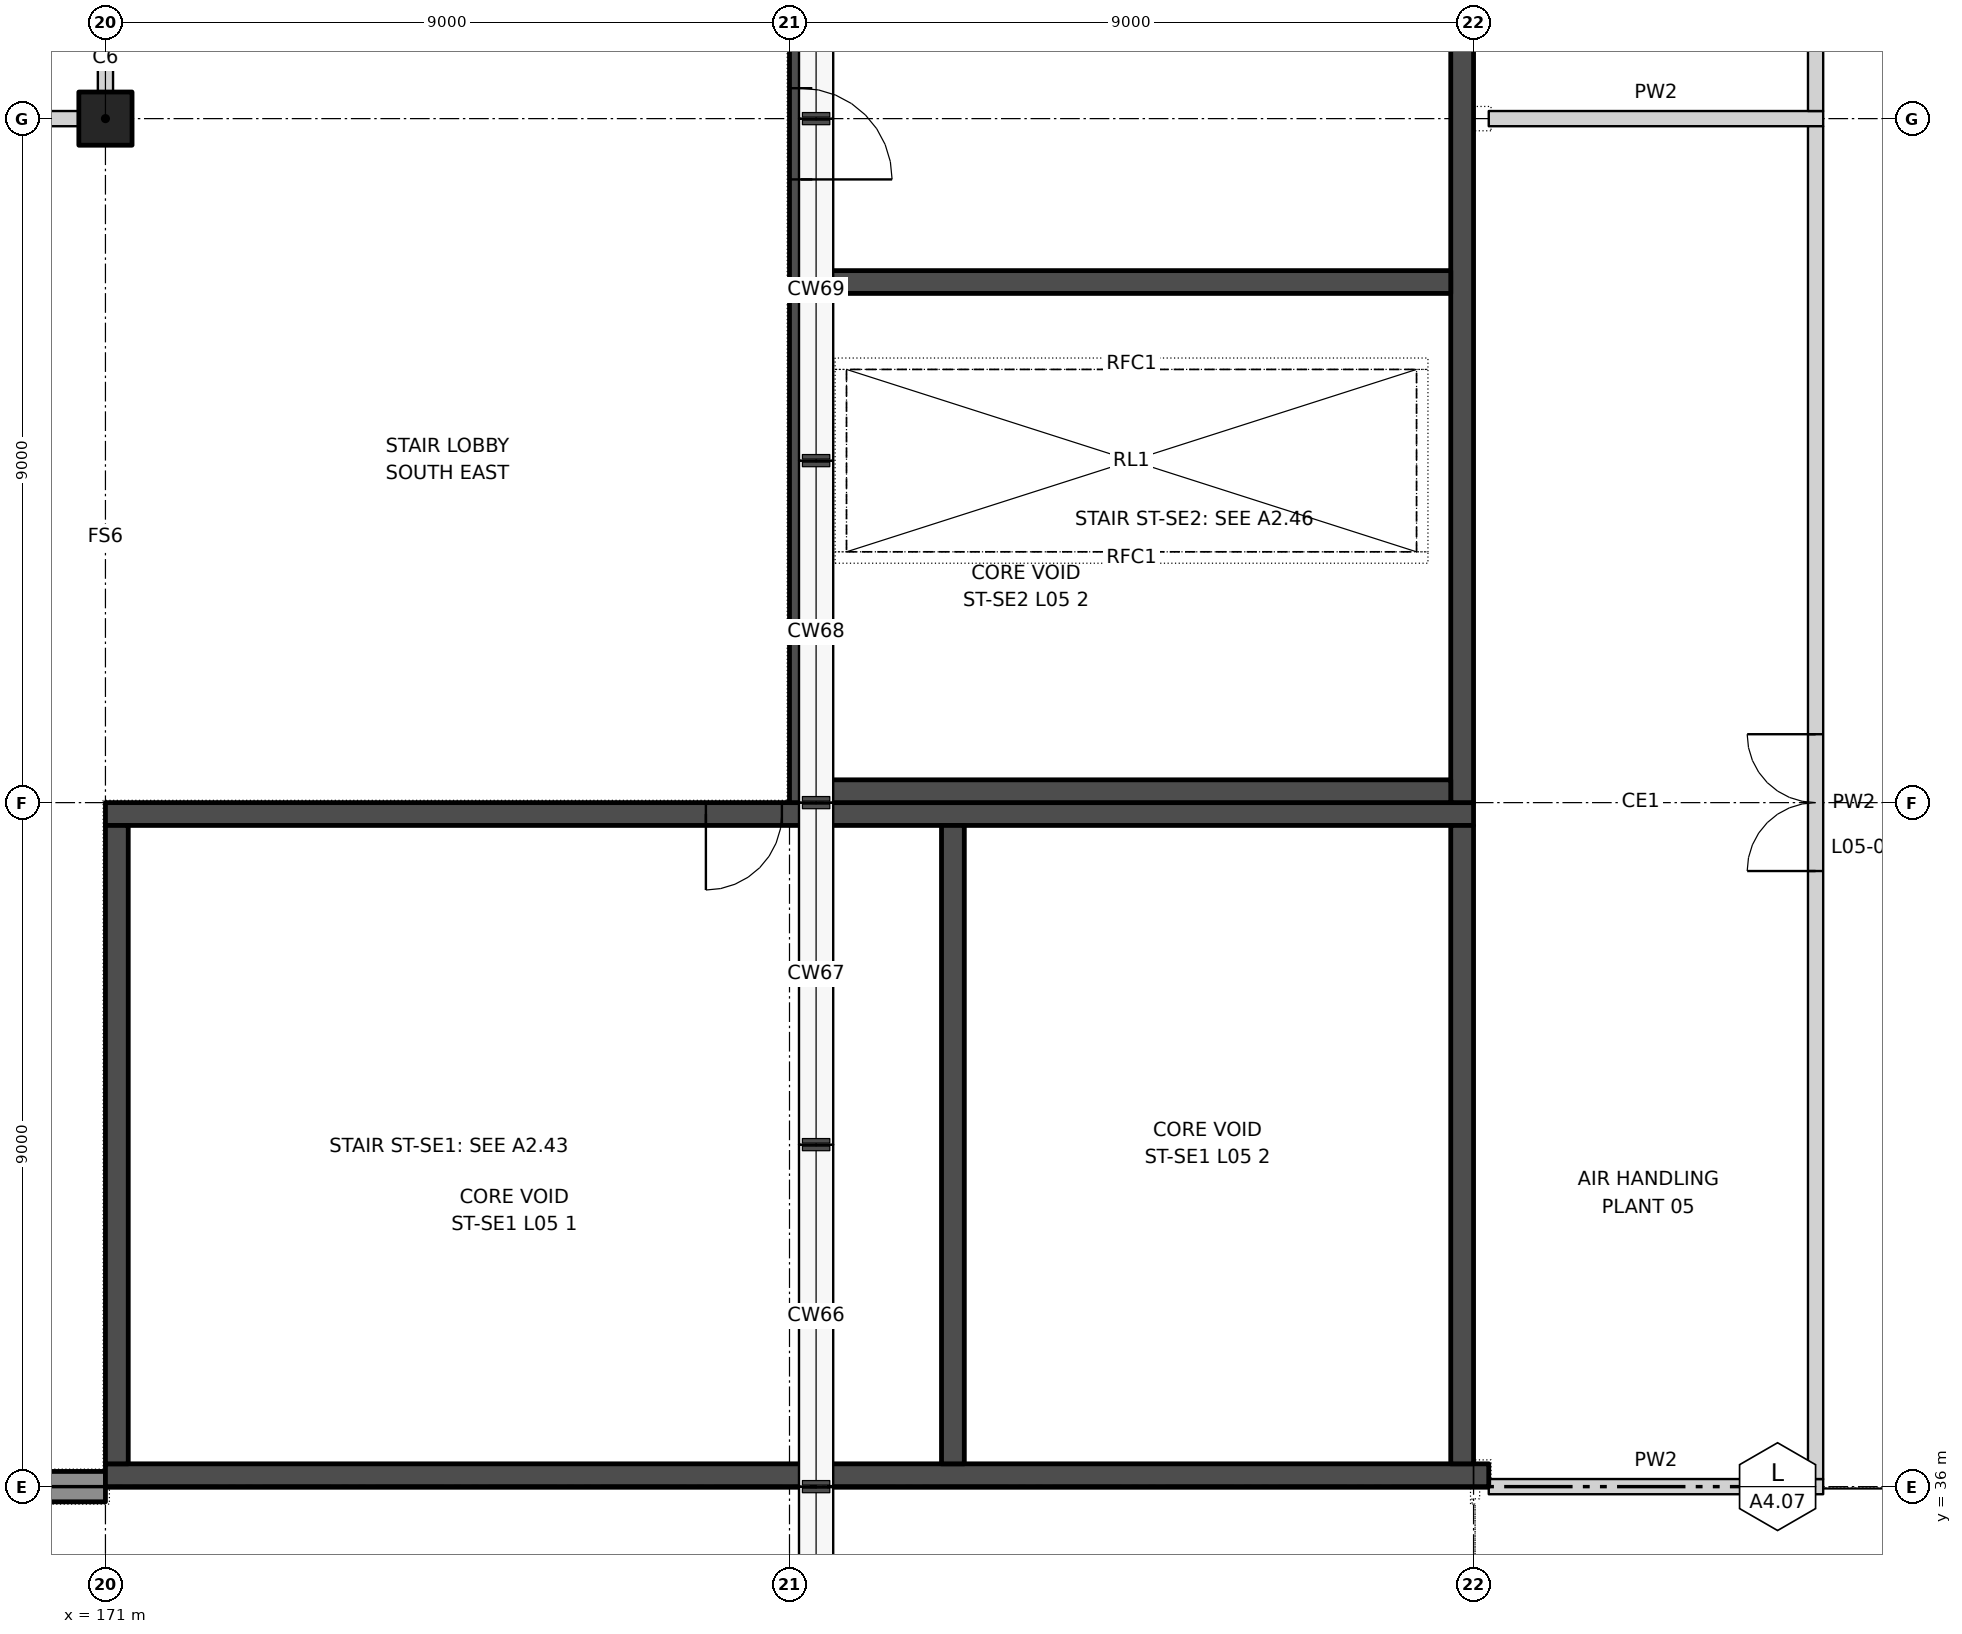
"""IFC4 building model, lengths in metres.
Left out: names, types, materials, properties, quantities, classifications, styles, units other than length and angle.
Written with IfcOpenShell. Run it as: python <this file> out.ifc"""

import sys

from ifc_helpers import new_model, si_unit, direction, frame, frame_2d, origin, origin_2d, place, context, subcontext, project, spatial, rectangle, extrude, element, fill, save


model = new_model("IFC4")
c1 = context("Model", 3, precision=1e-05, world=origin(), true_north=direction((0.0, 1.0)))
c2 = subcontext(c1, "Body", "Model", "MODEL_VIEW")
j1 = project(units=[si_unit("LENGTHUNIT", "METRE"), si_unit("PLANEANGLEUNIT", "RADIAN")], contexts=[c1])
p1 = place(None, origin())
s1 = spatial("IfcSite", under=j1, at=p1, CompositionType="ELEMENT")
p2 = place(p1, origin())
s2 = spatial("IfcBuilding", under=s1, at=p2, CompositionType="ELEMENT")
p3 = place(p2, frame((0.0, 0.0, 33.5)))
s3 = spatial("IfcBuildingStorey", under=s2, at=p3, CompositionType="ELEMENT", Elevation=33.5)
p4 = place(p3, frame((171.0, 54.0, 0.0), z_axis=(0.0, 0.0, 1.0), x_axis=(1.0, 0.0, 0.0)))
e1 = element("IfcColumn", 1, at=p4, inside=s3, PredefinedType="COLUMN", context=c2, shape_type="SweptSolid", body=[
    extrude(rectangle(XDim=0.7, YDim=0.7, at=origin_2d()), origin(), (0.0, 0.0, 1.0), 4.0),
])
p5 = place(p3, frame((90.0, 36.0, 0.0), z_axis=(0.0, 0.0, 1.0), x_axis=(1.0, 0.0, 0.0)))
e2 = element("IfcWall", 2, at=p5, inside=s3, PredefinedType="SOLIDWALL", context=c2, shape_type="SweptSolid", body=[
    extrude(rectangle(XDim=81.0, YDim=0.4, at=frame_2d((40.5, 0.0))), origin(), (0.0, 0.0, 1.0), 4.0),
])
p6 = place(p5, frame((3.9, 0.0, 0.0)))
e3 = element("IfcOpeningElement", 3, at=p6, cuts=e2, PredefinedType="OPENING", context=c2, shape_type="SweptSolid", body=[
    extrude(rectangle(XDim=1.2, YDim=2.1, at=frame_2d((0.6, 1.05))), frame((0.0, 0.21, 0.0), z_axis=(0.0, -1.0, 0.0), x_axis=(1.0, 0.0, 0.0)), (0.0, 0.0, 1.0), 0.42),
])
p7 = place(p5, frame((75.9, 0.0, 0.0)))
e4 = element("IfcOpeningElement", 4, at=p7, cuts=e2, PredefinedType="OPENING", context=c2, shape_type="SweptSolid", body=[
    extrude(rectangle(XDim=1.2, YDim=2.1, at=frame_2d((0.6, 1.05))), frame((0.0, 0.21, 0.0), z_axis=(0.0, -1.0, 0.0), x_axis=(1.0, 0.0, 0.0)), (0.0, 0.0, 1.0), 0.42),
])
p8 = place(p3, frame((189.2, 36.0, 0.0), z_axis=(0.0, 0.0, 1.0), x_axis=(1.0, 0.0, 0.0)))
e5 = element("IfcWall", 5, at=p8, inside=s3, PredefinedType="PARTITIONING", context=c2, shape_type="SweptSolid", body=[
    extrude(rectangle(XDim=4.4, YDim=0.2, at=frame_2d((2.2, 0.0))), origin(), (0.0, 0.0, 1.0), 4.0),
])
p9 = place(p3, frame((162.35, 54.0, 0.0), z_axis=(0.0, 0.0, 1.0), x_axis=(1.0, 0.0, 0.0)))
e6 = element("IfcWall", 6, at=p9, inside=s3, PredefinedType="PARTITIONING", context=c2, shape_type="SweptSolid", body=[
    extrude(rectangle(XDim=8.3, YDim=0.2, at=frame_2d((4.15, 0.0))), origin(), (0.0, 0.0, 1.0), 4.0),
])
p10 = place(p9, frame((3.55, 0.0, 0.0)))
e7 = element("IfcOpeningElement", 7, at=p10, cuts=e6, PredefinedType="OPENING", context=c2, shape_type="SweptSolid", body=[
    extrude(rectangle(XDim=1.2, YDim=2.1, at=frame_2d((0.6, 1.05))), frame((0.0, 0.11, 0.0), z_axis=(0.0, -1.0, 0.0), x_axis=(1.0, 0.0, 0.0)), (0.0, 0.0, 1.0), 0.22),
])
p11 = place(p3, frame((189.2, 54.0, 0.0), z_axis=(0.0, 0.0, 1.0), x_axis=(1.0, 0.0, 0.0)))
e8 = element("IfcWall", 8, at=p11, inside=s3, PredefinedType="PARTITIONING", context=c2, shape_type="SweptSolid", body=[
    extrude(rectangle(XDim=4.4, YDim=0.2, at=frame_2d((2.2, 0.0))), origin(), (0.0, 0.0, 1.0), 4.0),
])
p12 = place(p3, frame((171.0, 54.35, 0.0), z_axis=(0.0, 0.0, 1.0), x_axis=(0.0, 1.0, 0.0)))
e9 = element("IfcWall", 9, at=p12, inside=s3, PredefinedType="PARTITIONING", context=c2, shape_type="SweptSolid", body=[
    extrude(rectangle(XDim=5.65, YDim=0.2, at=frame_2d((2.825, 0.0))), origin(), (0.0, 0.0, 1.0), 4.0),
])
p13 = place(p3, frame((193.5, 36.1, 0.0), z_axis=(0.0, 0.0, 1.0), x_axis=(0.0, 1.0, 0.0)))
e10 = element("IfcWall", 10, at=p13, inside=s3, PredefinedType="PARTITIONING", context=c2, shape_type="SweptSolid", body=[
    extrude(rectangle(XDim=17.8, YDim=0.2, at=frame_2d((8.9, 0.0))), origin(), (0.0, 0.0, 1.0), 4.0),
])
p14 = place(p13, frame((8.0, 0.0, 0.0)))
e11 = element("IfcOpeningElement", 11, at=p14, cuts=e10, PredefinedType="OPENING", context=c2, shape_type="SweptSolid", body=[
    extrude(rectangle(XDim=1.8, YDim=2.1, at=frame_2d((0.9, 1.05))), frame((0.0, 0.11, 0.0), z_axis=(0.0, -1.0, 0.0), x_axis=(1.0, 0.0, 0.0)), (0.0, 0.0, 1.0), 0.22),
])
p15 = place(p3, frame((193.5, 54.1, 0.0), z_axis=(0.0, 0.0, 1.0), x_axis=(0.0, 1.0, 0.0)))
e12 = element("IfcWall", 12, at=p15, inside=s3, PredefinedType="PARTITIONING", context=c2, shape_type="SweptSolid", body=[
    extrude(rectangle(XDim=4.3, YDim=0.2, at=frame_2d((2.15, 0.0))), origin(), (0.0, 0.0, 1.0), 4.0),
])
p16 = place(p15, frame((1.65, 0.0, 0.0)))
e13 = element("IfcOpeningElement", 13, at=p16, cuts=e12, PredefinedType="OPENING", context=c2, shape_type="SweptSolid", body=[
    extrude(rectangle(XDim=1.0, YDim=2.1, at=frame_2d((0.5, 1.05))), frame((0.0, 0.11, 0.0), z_axis=(0.0, -1.0, 0.0), x_axis=(1.0, 0.0, 0.0)), (0.0, 0.0, 1.0), 0.22),
])
p17 = place(p3, frame((171.0, 44.85, 0.0), z_axis=(0.0, 0.0, 1.0), x_axis=(1.0, 0.0, 0.0)))
e14 = element("IfcWall", 14, at=p17, inside=s3, PredefinedType="SHEAR", context=c2, shape_type="SweptSolid", body=[
    extrude(rectangle(XDim=18.0, YDim=0.3, at=frame_2d((9.0, 0.0))), origin(), (0.0, 0.0, 1.0), 4.0),
])
p18 = place(p17, frame((7.9, 0.0, 0.0)))
e15 = element("IfcOpeningElement", 15, at=p18, cuts=e14, PredefinedType="OPENING", context=c2, shape_type="SweptSolid", body=[
    extrude(rectangle(XDim=1.0, YDim=2.1, at=frame_2d((0.5, 1.05))), frame((0.0, 0.16, 0.0), z_axis=(0.0, -1.0, 0.0), x_axis=(1.0, 0.0, 0.0)), (0.0, 0.0, 1.0), 0.32),
])
p19 = place(p3, frame((171.0, 36.15, 0.0), z_axis=(0.0, 0.0, 1.0), x_axis=(1.0, 0.0, 0.0)))
e16 = element("IfcWall", 16, at=p19, inside=s3, PredefinedType="SHEAR", context=c2, shape_type="SweptSolid", body=[
    extrude(rectangle(XDim=18.2, YDim=0.3, at=frame_2d((9.1, 0.0))), origin(), (0.0, 0.0, 1.0), 4.0),
])
for number, where, z_axis, x_axis in (
    (17, (171.15, 44.7, 0.0), (0.0, 0.0, 1.0), (0.0, -1.0, 0.0)),
    (18, (188.85, 44.7, 0.0), (0.0, 0.0, 1.0), (0.0, -1.0, 0.0)),
    (19, (182.15, 44.7, 0.0), (0.0, 0.0, 1.0), (0.0, -1.0, 0.0)),
):
    element("IfcWall", number, at=place(p3, frame(where, z_axis=z_axis, x_axis=x_axis)), inside=s3, PredefinedType="SHEAR", context=c2, shape_type="SweptSolid", body=[
        extrude(rectangle(XDim=8.4, YDim=0.3, at=frame_2d((4.2, 0.0))), origin(), (0.0, 0.0, 1.0), 4.0),
    ])
p20 = place(p3, frame((180.15, 63.0, 0.0), z_axis=(0.0, 0.0, 1.0), x_axis=(0.0, -1.0, 0.0)))
e20 = element("IfcWall", 20, at=p20, inside=s3, PredefinedType="SHEAR", context=c2, shape_type="SweptSolid", body=[
    extrude(rectangle(XDim=18.0, YDim=0.3, at=frame_2d((9.0, 0.0))), origin(), (0.0, 0.0, 1.0), 4.0),
])
p21 = place(p20, frame((8.6, 0.0, 0.0)))
e21 = element("IfcOpeningElement", 21, at=p21, cuts=e20, PredefinedType="OPENING", context=c2, shape_type="SweptSolid", body=[
    extrude(rectangle(XDim=1.2, YDim=2.1, at=frame_2d((0.6, 1.05))), frame((0.0, 0.16, 0.0), z_axis=(0.0, -1.0, 0.0), x_axis=(1.0, 0.0, 0.0)), (0.0, 0.0, 1.0), 0.32),
])
p22 = place(p3, frame((188.85, 63.0, 0.0), z_axis=(0.0, 0.0, 1.0), x_axis=(0.0, -1.0, 0.0)))
e22 = element("IfcWall", 22, at=p22, inside=s3, PredefinedType="SHEAR", context=c2, shape_type="SweptSolid", body=[
    extrude(rectangle(XDim=18.0, YDim=0.3, at=frame_2d((9.0, 0.0))), origin(), (0.0, 0.0, 1.0), 4.0),
])
for number, where, z_axis, x_axis in (
    (23, (180.3, 45.15, 0.0), (0.0, 0.0, 1.0), (1.0, 0.0, 0.0)),
    (24, (180.3, 51.85, 0.0), (0.0, 0.0, 1.0), (1.0, 0.0, 0.0)),
):
    element("IfcWall", number, at=place(p3, frame(where, z_axis=z_axis, x_axis=x_axis)), inside=s3, PredefinedType="SHEAR", context=c2, shape_type="SweptSolid", body=[
        extrude(rectangle(XDim=8.4, YDim=0.3, at=frame_2d((4.2, 0.0))), origin(), (0.0, 0.0, 1.0), 4.0),
    ])
p23 = place(p14, origin())
e25 = element("IfcDoor", 25, at=p23, inside=s3, OperationType="DOUBLE_DOOR_DOUBLE_SWING", PredefinedType="DOOR", context=c2, shape_type="SweptSolid", body=[
    extrude(rectangle(XDim=1.8, YDim=2.1, at=frame_2d((0.9, 1.05))), frame((0.0, 0.025, 0.0), z_axis=(0.0, -1.0, 0.0), x_axis=(1.0, 0.0, 0.0)), (0.0, 0.0, 1.0), 0.05),
])
fill(e11, e25)
p24 = place(p18, frame((1.0, 0.0, 0.0), z_axis=(0.0, 0.0, 1.0), x_axis=(-1.0, 0.0, 0.0)))
e26 = element("IfcDoor", 26, at=p24, inside=s3, OperationType="SINGLE_SWING_RIGHT", PredefinedType="DOOR", context=c2, shape_type="SweptSolid", body=[
    extrude(rectangle(XDim=1.0, YDim=2.1, at=frame_2d((0.5, 1.05))), frame((0.0, 0.025, 0.0), z_axis=(0.0, -1.0, 0.0), x_axis=(1.0, 0.0, 0.0)), (0.0, 0.0, 1.0), 0.05),
])
fill(e15, e26)
p25 = place(p21, origin())
e27 = element("IfcDoor", 27, at=p25, inside=s3, OperationType="SINGLE_SWING_RIGHT", PredefinedType="DOOR", context=c2, shape_type="SweptSolid", body=[
    extrude(rectangle(XDim=1.2, YDim=2.1, at=frame_2d((0.6, 1.05))), frame((0.0, 0.025, 0.0), z_axis=(0.0, -1.0, 0.0), x_axis=(1.0, 0.0, 0.0)), (0.0, 0.0, 1.0), 0.05),
])
fill(e21, e27)
p26 = place(p2, frame((0.0, 0.0, 47.1)))
p27 = place(p26, frame((0.0, 0.0, -0.3)))
p28 = place(p27, frame((184.5, 49.5, 0.0)))
p29 = place(p28, frame((0.0, 0.0, 0.25)))
e28 = element("IfcWindow", 28, at=p29, inside=s3, PartitioningType="SINGLE_PANEL", PredefinedType="SKYLIGHT", context=c2, shape_type="SweptSolid", body=[
    extrude(rectangle(XDim=7.5, YDim=2.4, at=origin_2d()), origin(), (0.0, 0.0, 1.0), 0.05),
])
save(model, sys.argv[1])
